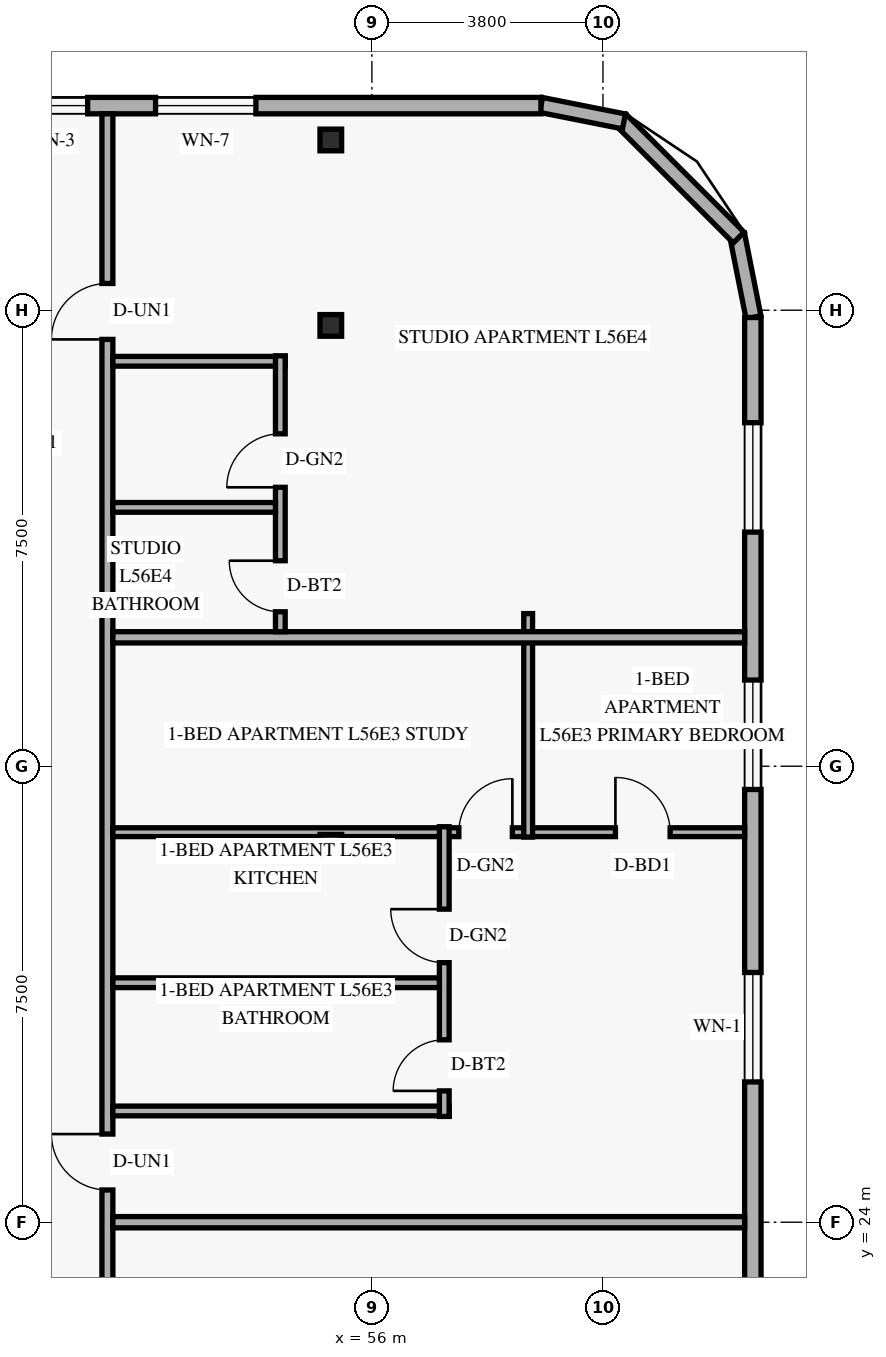
"""IFC4 building model, lengths in metres.
Left out: names, types, materials, properties, quantities, classifications, styles, units other than length and angle.
Written with IfcOpenShell. Run it as: python <this file> out.ifc"""

import sys

from ifc_helpers import new_model, si_unit, direction, frame, frame_2d, origin, origin_2d, place, context, subcontext, project, spatial, rectangle, hollow_rectangle, extrude, element, fill, save


model = new_model("IFC4")
c1 = context("Model", 3, precision=1e-05, world=origin(), true_north=direction((0.0, 1.0)))
c2 = subcontext(c1, "Body", "Model", "MODEL_VIEW")
j1 = project(units=[si_unit("LENGTHUNIT", "METRE"), si_unit("PLANEANGLEUNIT", "RADIAN")], contexts=[c1])
p1 = place(None, origin())
s1 = spatial("IfcSite", under=j1, at=p1, CompositionType="ELEMENT")
p2 = place(p1, origin())
s2 = spatial("IfcBuilding", under=s1, at=p2, CompositionType="ELEMENT")
p3 = place(p2, frame((0.0, 0.0, 216.6)))
s3 = spatial("IfcBuildingStorey", under=s2, at=p3, CompositionType="ELEMENT", Elevation=216.6)
for number, where, z_axis, x_axis in (
    (1, (55.219, 30.2, 0.0), (0.058, 0.0, 0.998), (0.0, 1.0, 0.0)),
    (2, (55.219, 38.75, 0.0), (0.058, 0.0, 0.998), (0.0, 1.0, 0.0)),
    (3, (55.219, 41.8, 0.0), (0.058, 0.0, 0.998), (0.0, 1.0, 0.0)),
):
    element("IfcColumn", number, at=place(p3, frame(where, z_axis=z_axis, x_axis=x_axis)), inside=s3, PredefinedType="COLUMN", context=c2, shape_type="SweptSolid", body=[
        extrude(hollow_rectangle(XDim=0.356, YDim=0.356, WallThickness=0.016, at=origin_2d()), origin(), (0.0, 0.0, 1.0), 3.606),
    ])
p4 = place(p3, frame((62.276, 38.884, 0.0), z_axis=(0.0, 0.0, 1.0), x_axis=(-0.195135625965, 0.9807762678, 0.0)))
e4 = element("IfcWall", 4, at=p4, inside=s3, PredefinedType="SOLIDWALL", context=c2, shape_type="SweptSolid", body=[
    extrude(rectangle(XDim=1.389, YDim=0.25, at=frame_2d((0.694, 0.0))), origin(), (0.0, 0.0, 1.0), 3.36),
])
p5 = place(p3, frame((62.032, 40.195, 0.0), z_axis=(0.0, 0.0, 1.0), x_axis=(-0.707106781187, 0.707106781187, 0.0)))
e5 = element("IfcWall", 5, at=p5, inside=s3, PredefinedType="SOLIDWALL", context=c2, shape_type="SweptSolid", body=[
    extrude(rectangle(XDim=2.739, YDim=0.25, at=frame_2d((1.37, 0.0))), origin(), (0.0, 0.0, 1.0), 3.36),
])
p6 = place(p3, frame((60.146, 42.105, 0.0), z_axis=(0.0, 0.0, 1.0), x_axis=(-0.980809899341, 0.19496651342, 0.0)))
e6 = element("IfcWall", 6, at=p6, inside=s3, PredefinedType="SOLIDWALL", context=c2, shape_type="SweptSolid", body=[
    extrude(rectangle(XDim=1.389, YDim=0.25, at=frame_2d((0.694, 0.0))), origin(), (0.0, 0.0, 1.0), 3.36),
])
p7 = place(p3, frame((62.265, 9.12, 0.0), z_axis=(0.0, 0.0, 1.0), x_axis=(0.0, 1.0, 0.0)))
e7 = element("IfcWall", 7, at=p7, inside=s3, PredefinedType="SOLIDWALL", context=c2, shape_type="SweptSolid", body=[
    extrude(rectangle(XDim=29.76, YDim=0.27, at=frame_2d((14.88, 0.0))), origin(), (0.0, 0.0, 1.0), 3.36),
])
p8 = place(p7, frame((1.73, 0.0, 0.85)))
e8 = element("IfcOpeningElement", 8, at=p8, cuts=e7, PredefinedType="OPENING", context=c2, shape_type="SweptSolid", body=[
    extrude(rectangle(XDim=1.8, YDim=1.6, at=frame_2d((0.9, 0.8))), frame((0.0, 0.145, 0.0), z_axis=(0.0, -1.0, 0.0), x_axis=(1.0, 0.0, 0.0)), (0.0, 0.0, 1.0), 0.29),
])
p9 = place(p7, frame((7.305, 0.0, 0.85)))
e9 = element("IfcOpeningElement", 9, at=p9, cuts=e7, PredefinedType="OPENING", context=c2, shape_type="SweptSolid", body=[
    extrude(rectangle(XDim=1.8, YDim=1.6, at=frame_2d((0.9, 0.8))), frame((0.0, 0.145, 0.0), z_axis=(0.0, -1.0, 0.0), x_axis=(1.0, 0.0, 0.0)), (0.0, 0.0, 1.0), 0.29),
])
p10 = place(p7, frame((12.115, 0.0, 0.85)))
e10 = element("IfcOpeningElement", 10, at=p10, cuts=e7, PredefinedType="OPENING", context=c2, shape_type="SweptSolid", body=[
    extrude(rectangle(XDim=1.8, YDim=1.6, at=frame_2d((0.9, 0.8))), frame((0.0, 0.145, 0.0), z_axis=(0.0, -1.0, 0.0), x_axis=(1.0, 0.0, 0.0)), (0.0, 0.0, 1.0), 0.29),
])
p11 = place(p7, frame((17.188, 0.0, 0.85)))
e11 = element("IfcOpeningElement", 11, at=p11, cuts=e7, PredefinedType="OPENING", context=c2, shape_type="SweptSolid", body=[
    extrude(rectangle(XDim=1.8, YDim=1.6, at=frame_2d((0.9, 0.8))), frame((0.0, 0.145, 0.0), z_axis=(0.0, -1.0, 0.0), x_axis=(1.0, 0.0, 0.0)), (0.0, 0.0, 1.0), 0.29),
])
p12 = place(p7, frame((21.997, 0.0, 0.85)))
e12 = element("IfcOpeningElement", 12, at=p12, cuts=e7, PredefinedType="OPENING", context=c2, shape_type="SweptSolid", body=[
    extrude(rectangle(XDim=1.8, YDim=1.6, at=frame_2d((0.9, 0.8))), frame((0.0, 0.145, 0.0), z_axis=(0.0, -1.0, 0.0), x_axis=(1.0, 0.0, 0.0)), (0.0, 0.0, 1.0), 0.29),
])
p13 = place(p7, frame((26.23, 0.0, 0.85)))
e13 = element("IfcOpeningElement", 13, at=p13, cuts=e7, PredefinedType="OPENING", context=c2, shape_type="SweptSolid", body=[
    extrude(rectangle(XDim=1.8, YDim=1.6, at=frame_2d((0.9, 0.8))), frame((0.0, 0.145, 0.0), z_axis=(0.0, -1.0, 0.0), x_axis=(1.0, 0.0, 0.0)), (0.0, 0.0, 1.0), 0.29),
])
p14 = place(p3, frame((58.78, 42.365, 0.0), z_axis=(0.0, 0.0, 1.0), x_axis=(-1.0, 0.0, 0.0)))
e14 = element("IfcWall", 14, at=p14, inside=s3, PredefinedType="SOLIDWALL", context=c2, shape_type="SweptSolid", body=[
    extrude(rectangle(XDim=32.96, YDim=0.27, at=frame_2d((16.48, 0.0))), origin(), (0.0, 0.0, 1.0), 3.36),
])
p15 = place(p14, frame((27.665, 0.0, 0.85)))
e15 = element("IfcOpeningElement", 15, at=p15, cuts=e14, PredefinedType="OPENING", context=c2, shape_type="SweptSolid", body=[
    extrude(rectangle(XDim=1.65, YDim=1.6, at=frame_2d((0.825, 0.8))), frame((0.0, 0.145, 0.0), z_axis=(0.0, -1.0, 0.0), x_axis=(1.0, 0.0, 0.0)), (0.0, 0.0, 1.0), 0.29),
])
p16 = place(p14, frame((15.135, 0.0, 0.85)))
e16 = element("IfcOpeningElement", 16, at=p16, cuts=e14, PredefinedType="OPENING", context=c2, shape_type="SweptSolid", body=[
    extrude(rectangle(XDim=1.65, YDim=1.6, at=frame_2d((0.825, 0.8))), frame((0.0, 0.145, 0.0), z_axis=(0.0, -1.0, 0.0), x_axis=(1.0, 0.0, 0.0)), (0.0, 0.0, 1.0), 0.29),
])
p17 = place(p14, frame((7.455, 0.0, 0.85)))
e17 = element("IfcOpeningElement", 17, at=p17, cuts=e14, PredefinedType="OPENING", context=c2, shape_type="SweptSolid", body=[
    extrude(rectangle(XDim=1.2, YDim=1.5, at=frame_2d((0.6, 0.75))), frame((0.0, 0.145, 0.0), z_axis=(0.0, -1.0, 0.0), x_axis=(1.0, 0.0, 0.0)), (0.0, 0.0, 1.0), 0.29),
])
p18 = place(p14, frame((4.688, 0.0, 0.85)))
e18 = element("IfcOpeningElement", 18, at=p18, cuts=e14, PredefinedType="OPENING", context=c2, shape_type="SweptSolid", body=[
    extrude(rectangle(XDim=1.65, YDim=1.6, at=frame_2d((0.825, 0.8))), frame((0.0, 0.145, 0.0), z_axis=(0.0, -1.0, 0.0), x_axis=(1.0, 0.0, 0.0)), (0.0, 0.0, 1.0), 0.29),
])
p19 = place(p3, frame((51.65, 5.77, 0.0), z_axis=(0.0, 0.0, 1.0), x_axis=(0.0, 1.0, 0.0)))
e19 = element("IfcWall", 19, at=p19, inside=s3, PredefinedType="STANDARD", context=c2, shape_type="SweptSolid", body=[
    extrude(rectangle(XDim=36.46, YDim=0.18, at=frame_2d((18.23, 0.0))), origin(), (0.0, 0.0, 1.0), 2.803),
])
p20 = place(p19, frame((2.67, 0.0, 0.0)))
e20 = element("IfcOpeningElement", 20, at=p20, cuts=e19, PredefinedType="OPENING", context=c2, shape_type="SweptSolid", body=[
    extrude(rectangle(XDim=0.92, YDim=2.15, at=frame_2d((0.46, 1.075))), frame((0.0, 0.1, 0.0), z_axis=(0.0, -1.0, 0.0), x_axis=(1.0, 0.0, 0.0)), (0.0, 0.0, 1.0), 0.2),
])
p21 = place(p19, frame((13.61, 0.0, 0.0)))
e21 = element("IfcOpeningElement", 21, at=p21, cuts=e19, PredefinedType="OPENING", context=c2, shape_type="SweptSolid", body=[
    extrude(rectangle(XDim=0.92, YDim=2.15, at=frame_2d((0.46, 1.075))), frame((0.0, 0.1, 0.0), z_axis=(0.0, -1.0, 0.0), x_axis=(1.0, 0.0, 0.0)), (0.0, 0.0, 1.0), 0.2),
])
p22 = place(p19, frame((18.76, 0.0, 0.0)))
e22 = element("IfcOpeningElement", 22, at=p22, cuts=e19, PredefinedType="OPENING", context=c2, shape_type="SweptSolid", body=[
    extrude(rectangle(XDim=0.92, YDim=2.15, at=frame_2d((0.46, 1.075))), frame((0.0, 0.1, 0.0), z_axis=(0.0, -1.0, 0.0), x_axis=(1.0, 0.0, 0.0)), (0.0, 0.0, 1.0), 0.2),
])
p23 = place(p19, frame((32.75, 0.0, 0.0)))
e23 = element("IfcOpeningElement", 23, at=p23, cuts=e19, PredefinedType="OPENING", context=c2, shape_type="SweptSolid", body=[
    extrude(rectangle(XDim=0.92, YDim=2.15, at=frame_2d((0.46, 1.075))), frame((0.0, 0.1, 0.0), z_axis=(0.0, -1.0, 0.0), x_axis=(1.0, 0.0, 0.0)), (0.0, 0.0, 1.0), 0.2),
])
p24 = place(p3, frame((51.74, 24.0, 0.0), z_axis=(0.0, 0.0, 1.0), x_axis=(1.0, 0.0, 0.0)))
e24 = element("IfcWall", 24, at=p24, inside=s3, PredefinedType="PARTITIONING", context=c2, shape_type="SweptSolid", body=[
    extrude(rectangle(XDim=10.39, YDim=0.185, at=frame_2d((5.195, 0.0))), origin(), (0.0, 0.0, 1.0), 2.879),
])
p25 = place(p3, frame((51.74, 30.415, 0.0), z_axis=(0.0, 0.0, 1.0), x_axis=(1.0, 0.0, 0.0)))
e25 = element("IfcWall", 25, at=p25, inside=s3, PredefinedType="PARTITIONING", context=c2, shape_type="SweptSolid", body=[
    extrude(rectangle(XDim=10.39, YDim=0.145, at=frame_2d((5.195, 0.0))), origin(), (0.0, 0.0, 1.0), 2.879),
])
p26 = place(p25, frame((5.69, 0.0, 0.0)))
e26 = element("IfcOpeningElement", 26, at=p26, cuts=e25, PredefinedType="OPENING", context=c2, shape_type="SweptSolid", body=[
    extrude(rectangle(XDim=0.88, YDim=2.12, at=frame_2d((0.44, 1.06))), frame((0.0, 0.083, 0.0), z_axis=(0.0, -1.0, 0.0), x_axis=(1.0, 0.0, 0.0)), (0.0, 0.0, 1.0), 0.165),
])
p27 = place(p25, frame((8.265, 0.0, 0.0)))
e27 = element("IfcOpeningElement", 27, at=p27, cuts=e25, PredefinedType="OPENING", context=c2, shape_type="SweptSolid", body=[
    extrude(rectangle(XDim=0.9, YDim=2.14, at=frame_2d((0.45, 1.07))), frame((0.0, 0.083, 0.0), z_axis=(0.0, -1.0, 0.0), x_axis=(1.0, 0.0, 0.0)), (0.0, 0.0, 1.0), 0.165),
])
p28 = place(p3, frame((51.74, 25.83, 0.0), z_axis=(0.0, 0.0, 1.0), x_axis=(1.0, 0.0, 0.0)))
e28 = element("IfcWall", 28, at=p28, inside=s3, PredefinedType="PLUMBINGWALL", context=c2, shape_type="SweptSolid", body=[
    extrude(rectangle(XDim=5.53, YDim=0.16, at=frame_2d((2.765, 0.0))), origin(), (0.0, 0.0, 1.0), 2.879),
])
p29 = place(p3, frame((57.19, 25.74, 0.0), z_axis=(0.0, 0.0, 1.0), x_axis=(0.0, 1.0, 0.0)))
e29 = element("IfcWall", 29, at=p29, inside=s3, PredefinedType="PLUMBINGWALL", context=c2, shape_type="SweptSolid", body=[
    extrude(rectangle(XDim=4.765, YDim=0.16, at=frame_2d((2.382, 0.0))), origin(), (0.0, 0.0, 1.0), 3.36),
])
p30 = place(p29, frame((0.42, 0.0, 0.0)))
e30 = element("IfcOpeningElement", 30, at=p30, cuts=e29, PredefinedType="OPENING", context=c2, shape_type="SweptSolid", body=[
    extrude(rectangle(XDim=0.84, YDim=2.12, at=frame_2d((0.42, 1.06))), frame((0.0, 0.09, 0.0), z_axis=(0.0, -1.0, 0.0), x_axis=(1.0, 0.0, 0.0)), (0.0, 0.0, 1.0), 0.18),
])
p31 = place(p29, frame((2.529, 0.0, 0.0)))
e31 = element("IfcOpeningElement", 31, at=p31, cuts=e29, PredefinedType="OPENING", context=c2, shape_type="SweptSolid", body=[
    extrude(rectangle(XDim=0.88, YDim=2.12, at=frame_2d((0.44, 1.06))), frame((0.0, 0.09, 0.0), z_axis=(0.0, -1.0, 0.0), x_axis=(1.0, 0.0, 0.0)), (0.0, 0.0, 1.0), 0.18),
])
p32 = place(p3, frame((51.74, 27.939, 0.0), z_axis=(0.0, 0.0, 1.0), x_axis=(1.0, 0.0, 0.0)))
e32 = element("IfcWall", 32, at=p32, inside=s3, PredefinedType="PLUMBINGWALL", context=c2, shape_type="SweptSolid", body=[
    extrude(rectangle(XDim=5.37, YDim=0.16, at=frame_2d((2.685, 0.0))), origin(), (0.0, 0.0, 1.0), 2.879),
])
p33 = place(p3, frame((58.57, 30.335, 0.0), z_axis=(0.0, 0.0, 1.0), x_axis=(0.0, 1.0, 0.0)))
e33 = element("IfcWall", 33, at=p33, inside=s3, PredefinedType="PARTITIONING", context=c2, shape_type="SweptSolid", body=[
    extrude(rectangle(XDim=3.675, YDim=0.145, at=frame_2d((1.838, 0.0))), origin(), (0.0, 0.0, 1.0), 3.36),
])
p34 = place(p3, frame((51.74, 33.62, 0.0), z_axis=(0.0, 0.0, 1.0), x_axis=(1.0, 0.0, 0.0)))
e34 = element("IfcWall", 34, at=p34, inside=s3, PredefinedType="PARTITIONING", context=c2, shape_type="SweptSolid", body=[
    extrude(rectangle(XDim=10.39, YDim=0.185, at=frame_2d((5.195, 0.0))), origin(), (0.0, 0.0, 1.0), 2.879),
])
p35 = place(p3, frame((51.74, 38.16, 0.0), z_axis=(0.0, 0.0, 1.0), x_axis=(1.0, 0.0, 0.0)))
e35 = element("IfcWall", 35, at=p35, inside=s3, PredefinedType="PLUMBINGWALL", context=c2, shape_type="SweptSolid", body=[
    extrude(rectangle(XDim=2.834, YDim=0.16, at=frame_2d((1.417, 0.0))), origin(), (0.0, 0.0, 1.0), 3.36),
])
p36 = place(p3, frame((54.494, 33.712, 0.0), z_axis=(0.0, 0.0, 1.0), x_axis=(0.0, 1.0, 0.0)))
e36 = element("IfcWall", 36, at=p36, inside=s3, PredefinedType="PLUMBINGWALL", context=c2, shape_type="SweptSolid", body=[
    extrude(rectangle(XDim=4.538, YDim=0.16, at=frame_2d((2.269, 0.0))), origin(), (0.0, 0.0, 1.0), 3.039),
])
p37 = place(p36, frame((0.327, 0.0, 0.0)))
e37 = element("IfcOpeningElement", 37, at=p37, cuts=e36, PredefinedType="OPENING", context=c2, shape_type="SweptSolid", body=[
    extrude(rectangle(XDim=0.84, YDim=2.12, at=frame_2d((0.42, 1.06))), frame((0.0, 0.09, 0.0), z_axis=(0.0, -1.0, 0.0), x_axis=(1.0, 0.0, 0.0)), (0.0, 0.0, 1.0), 0.18),
])
p38 = place(p36, frame((2.375, 0.0, 0.0)))
e38 = element("IfcOpeningElement", 38, at=p38, cuts=e36, PredefinedType="OPENING", context=c2, shape_type="SweptSolid", body=[
    extrude(rectangle(XDim=0.88, YDim=2.12, at=frame_2d((0.44, 1.06))), frame((0.0, 0.09, 0.0), z_axis=(0.0, -1.0, 0.0), x_axis=(1.0, 0.0, 0.0)), (0.0, 0.0, 1.0), 0.18),
])
p39 = place(p3, frame((51.74, 35.757, 0.0), z_axis=(0.0, 0.0, 1.0), x_axis=(1.0, 0.0, 0.0)))
e39 = element("IfcWall", 39, at=p39, inside=s3, PredefinedType="PLUMBINGWALL", context=c2, shape_type="SweptSolid", body=[
    extrude(rectangle(XDim=2.674, YDim=0.16, at=frame_2d((1.337, 0.0))), origin(), (0.0, 0.0, 1.0), 3.36),
])
p40 = place(p11, origin())
e40 = element("IfcWindow", 40, at=p40, inside=s3, PartitioningType="SINGLE_PANEL", PredefinedType="WINDOW", context=c2, shape_type="SweptSolid", body=[
    extrude(rectangle(XDim=1.8, YDim=1.6, at=frame_2d((0.9, 0.8))), frame((0.0, 0.03, 0.0), z_axis=(0.0, -1.0, 0.0), x_axis=(1.0, 0.0, 0.0)), (0.0, 0.0, 1.0), 0.06),
])
fill(e11, e40)
p41 = place(p12, origin())
e41 = element("IfcWindow", 41, at=p41, inside=s3, PartitioningType="SINGLE_PANEL", PredefinedType="WINDOW", context=c2, shape_type="SweptSolid", body=[
    extrude(rectangle(XDim=1.8, YDim=1.6, at=frame_2d((0.9, 0.8))), frame((0.0, 0.03, 0.0), z_axis=(0.0, -1.0, 0.0), x_axis=(1.0, 0.0, 0.0)), (0.0, 0.0, 1.0), 0.06),
])
fill(e12, e41)
p42 = place(p13, origin())
e42 = element("IfcWindow", 42, at=p42, inside=s3, PartitioningType="SINGLE_PANEL", PredefinedType="WINDOW", context=c2, shape_type="SweptSolid", body=[
    extrude(rectangle(XDim=1.8, YDim=1.6, at=frame_2d((0.9, 0.8))), frame((0.0, 0.03, 0.0), z_axis=(0.0, -1.0, 0.0), x_axis=(1.0, 0.0, 0.0)), (0.0, 0.0, 1.0), 0.06),
])
fill(e13, e42)
p43 = place(p17, origin())
e43 = element("IfcWindow", 43, at=p43, inside=s3, PartitioningType="SINGLE_PANEL", PredefinedType="WINDOW", context=c2, shape_type="SweptSolid", body=[
    extrude(rectangle(XDim=1.2, YDim=1.5, at=frame_2d((0.6, 0.75))), frame((0.0, 0.03, 0.0), z_axis=(0.0, -1.0, 0.0), x_axis=(1.0, 0.0, 0.0)), (0.0, 0.0, 1.0), 0.06),
])
fill(e17, e43)
p44 = place(p18, origin())
e44 = element("IfcWindow", 44, at=p44, inside=s3, PartitioningType="SINGLE_PANEL", PredefinedType="WINDOW", context=c2, shape_type="SweptSolid", body=[
    extrude(rectangle(XDim=1.65, YDim=1.6, at=frame_2d((0.825, 0.8))), frame((0.0, 0.03, 0.0), z_axis=(0.0, -1.0, 0.0), x_axis=(1.0, 0.0, 0.0)), (0.0, 0.0, 1.0), 0.06),
])
fill(e18, e44)
p45 = place(p22, origin())
e45 = element("IfcDoor", 45, at=p45, inside=s3, OperationType="SINGLE_SWING_RIGHT", PredefinedType="DOOR", context=c2, shape_type="SweptSolid", body=[
    extrude(rectangle(XDim=0.92, YDim=2.15, at=frame_2d((0.46, 1.075))), frame((0.0, 0.025, 0.0), z_axis=(0.0, -1.0, 0.0), x_axis=(1.0, 0.0, 0.0)), (0.0, 0.0, 1.0), 0.05),
])
fill(e22, e45)
p46 = place(p30, origin())
e46 = element("IfcDoor", 46, at=p46, inside=s3, OperationType="SINGLE_SWING_LEFT", PredefinedType="DOOR", context=c2, shape_type="SweptSolid", body=[
    extrude(rectangle(XDim=0.84, YDim=2.12, at=frame_2d((0.42, 1.06))), frame((0.0, 0.025, 0.0), z_axis=(0.0, -1.0, 0.0), x_axis=(1.0, 0.0, 0.0)), (0.0, 0.0, 1.0), 0.05),
])
fill(e30, e46)
p47 = place(p31, origin())
e47 = element("IfcDoor", 47, at=p47, inside=s3, OperationType="SINGLE_SWING_RIGHT", PredefinedType="DOOR", context=c2, shape_type="SweptSolid", body=[
    extrude(rectangle(XDim=0.88, YDim=2.12, at=frame_2d((0.44, 1.06))), frame((0.0, 0.025, 0.0), z_axis=(0.0, -1.0, 0.0), x_axis=(1.0, 0.0, 0.0)), (0.0, 0.0, 1.0), 0.05),
])
fill(e31, e47)
p48 = place(p26, origin())
e48 = element("IfcDoor", 48, at=p48, inside=s3, OperationType="SINGLE_SWING_RIGHT", PredefinedType="DOOR", context=c2, shape_type="SweptSolid", body=[
    extrude(rectangle(XDim=0.88, YDim=2.12, at=frame_2d((0.44, 1.06))), frame((0.0, 0.025, 0.0), z_axis=(0.0, -1.0, 0.0), x_axis=(1.0, 0.0, 0.0)), (0.0, 0.0, 1.0), 0.05),
])
fill(e26, e48)
p49 = place(p27, origin())
e49 = element("IfcDoor", 49, at=p49, inside=s3, OperationType="SINGLE_SWING_LEFT", PredefinedType="DOOR", context=c2, shape_type="SweptSolid", body=[
    extrude(rectangle(XDim=0.9, YDim=2.14, at=frame_2d((0.45, 1.07))), frame((0.0, 0.025, 0.0), z_axis=(0.0, -1.0, 0.0), x_axis=(1.0, 0.0, 0.0)), (0.0, 0.0, 1.0), 0.05),
])
fill(e27, e49)
p50 = place(p23, origin())
e50 = element("IfcDoor", 50, at=p50, inside=s3, OperationType="SINGLE_SWING_LEFT", PredefinedType="DOOR", context=c2, shape_type="SweptSolid", body=[
    extrude(rectangle(XDim=0.92, YDim=2.15, at=frame_2d((0.46, 1.075))), frame((0.0, 0.025, 0.0), z_axis=(0.0, -1.0, 0.0), x_axis=(1.0, 0.0, 0.0)), (0.0, 0.0, 1.0), 0.05),
])
fill(e23, e50)
p51 = place(p37, origin())
e51 = element("IfcDoor", 51, at=p51, inside=s3, OperationType="SINGLE_SWING_RIGHT", PredefinedType="DOOR", context=c2, shape_type="SweptSolid", body=[
    extrude(rectangle(XDim=0.84, YDim=2.12, at=frame_2d((0.42, 1.06))), frame((0.0, 0.025, 0.0), z_axis=(0.0, -1.0, 0.0), x_axis=(1.0, 0.0, 0.0)), (0.0, 0.0, 1.0), 0.05),
])
fill(e37, e51)
p52 = place(p38, origin())
e52 = element("IfcDoor", 52, at=p52, inside=s3, OperationType="SINGLE_SWING_LEFT", PredefinedType="DOOR", context=c2, shape_type="SweptSolid", body=[
    extrude(rectangle(XDim=0.88, YDim=2.12, at=frame_2d((0.44, 1.06))), frame((0.0, 0.025, 0.0), z_axis=(0.0, -1.0, 0.0), x_axis=(1.0, 0.0, 0.0)), (0.0, 0.0, 1.0), 0.05),
])
fill(e38, e52)
save(model, sys.argv[1])
